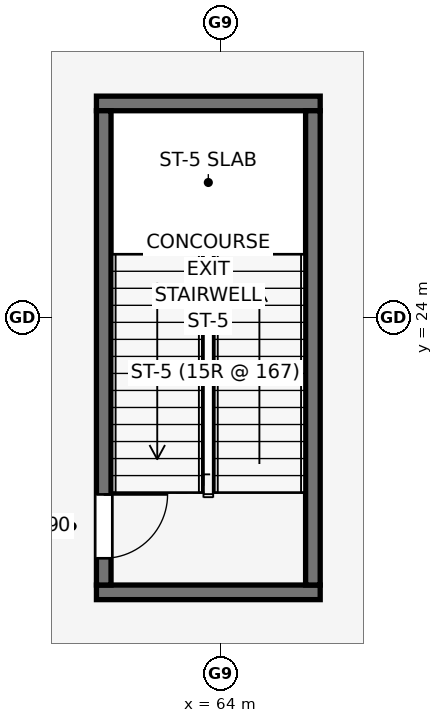
"""IFC4 building model, lengths in metres.
Left out: names, types, materials, properties, quantities, classifications, styles, units other than length and angle.
Written with IfcOpenShell. Run it as: python <this file> out.ifc"""

import sys

from ifc_helpers import new_model, si_unit, direction, frame, frame_2d, origin, place, context, subcontext, project, spatial, rectangle, extrude, element, fill, save


model = new_model("IFC4")
c1 = context("Model", 3, precision=1e-05, world=origin(), true_north=direction((0.0, 1.0)))
c2 = subcontext(c1, "Body", "Model", "MODEL_VIEW")
j1 = project(units=[si_unit("LENGTHUNIT", "METRE"), si_unit("PLANEANGLEUNIT", "RADIAN")], contexts=[c1])
p1 = place(None, origin())
s1 = spatial("IfcSite", under=j1, at=p1, CompositionType="ELEMENT")
p2 = place(p1, origin())
s2 = spatial("IfcBuilding", under=s1, at=p2, CompositionType="ELEMENT")
p3 = place(p2, frame((0.0, 0.0, 11.0)))
s3 = spatial("IfcBuildingStorey", under=s2, at=p3, CompositionType="ELEMENT", Elevation=11.0)
for number, where, z_axis, x_axis in (
    (1, (61.96, 19.48, 0.0), (0.0, 0.0, 1.0), (1.0, 0.0, 0.0)),
    (2, (65.64, 27.52, 0.0), (0.0, 0.0, 1.0), (-1.0, 0.0, 0.0)),
):
    element("IfcWall", number, at=place(p3, frame(where, z_axis=z_axis, x_axis=x_axis)), inside=s3, PredefinedType="SHEAR", context=c2, shape_type="SweptSolid", body=[
        extrude(rectangle(XDim=3.68, YDim=0.24, at=frame_2d((1.84, 0.0))), origin(), (0.0, 0.0, 1.0), 5.0),
    ])
p4 = place(p3, frame((62.08, 27.4, 0.0), z_axis=(0.0, 0.0, 1.0), x_axis=(0.0, -1.0, 0.0)))
e3 = element("IfcWall", 3, at=p4, inside=s3, PredefinedType="SHEAR", context=c2, shape_type="SweptSolid", body=[
    extrude(rectangle(XDim=7.8, YDim=0.24, at=frame_2d((3.9, 0.0))), origin(), (0.0, 0.0, 1.0), 5.0),
])
p5 = place(p4, frame((6.31, 0.0, 0.0)))
e4 = element("IfcOpeningElement", 4, at=p5, cuts=e3, PredefinedType="OPENING", context=c2, shape_type="SweptSolid", body=[
    extrude(rectangle(XDim=1.05, YDim=2.0, at=frame_2d((0.525, 1.0))), frame((0.0, 0.13, 0.0), z_axis=(0.0, -1.0, 0.0), x_axis=(1.0, 0.0, 0.0)), (0.0, 0.0, 1.0), 0.26),
])
p6 = place(p3, frame((65.52, 19.6, 0.0), z_axis=(0.0, 0.0, 1.0), x_axis=(0.0, 1.0, 0.0)))
e5 = element("IfcWall", 5, at=p6, inside=s3, PredefinedType="SHEAR", context=c2, shape_type="SweptSolid", body=[
    extrude(rectangle(XDim=7.8, YDim=0.24, at=frame_2d((3.9, 0.0))), origin(), (0.0, 0.0, 1.0), 5.0),
])
p7 = place(p5, origin())
e6 = element("IfcDoor", 6, at=p7, inside=s3, OperationType="SINGLE_SWING_LEFT", PredefinedType="DOOR", context=c2, shape_type="SweptSolid", body=[
    extrude(rectangle(XDim=1.05, YDim=2.0, at=frame_2d((0.525, 1.0))), frame((0.0, 0.025, 0.0), z_axis=(0.0, -1.0, 0.0), x_axis=(1.0, 0.0, 0.0)), (0.0, 0.0, 1.0), 0.05),
])
fill(e4, e6)
save(model, sys.argv[1])
